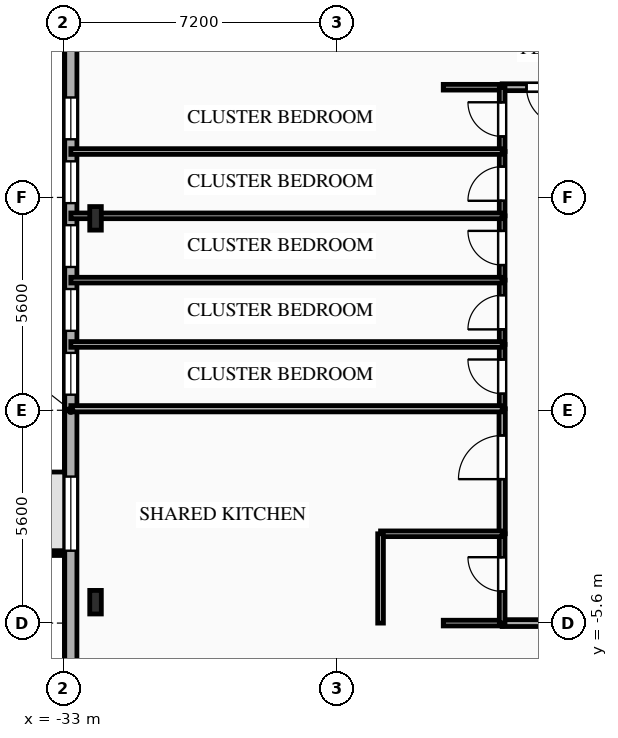
"""IFC4 building model, lengths in metres.
Left out: names, types, materials, properties, quantities, classifications, styles, units other than length and angle.
Written with IfcOpenShell. Run it as: python <this file> out.ifc"""

import sys

from ifc_helpers import new_model, si_unit, direction, frame, frame_2d, origin, origin_2d, place, context, subcontext, project, spatial, rectangle, i_section, extrude, element, fill, save


model = new_model("IFC4")
c1 = context("Model", 3, precision=1e-05, world=origin(), true_north=direction((0.0, 1.0)))
c2 = subcontext(c1, "Body", "Model", "MODEL_VIEW")
j1 = project(units=[si_unit("LENGTHUNIT", "METRE"), si_unit("PLANEANGLEUNIT", "RADIAN")], contexts=[c1])
p1 = place(None, origin())
s1 = spatial("IfcSite", under=j1, at=p1, CompositionType="ELEMENT")
p2 = place(p1, origin())
s2 = spatial("IfcBuilding", under=s1, at=p2, CompositionType="ELEMENT")
p3 = place(p2, frame((0.0, 0.0, 53.8)))
s3 = spatial("IfcBuildingStorey", under=s2, at=p3, CompositionType="ELEMENT", Elevation=53.8)
for number, where, z_axis, x_axis in (
    (1, (-32.15, 5.05, 0.0), (0.0, 0.0, 1.0), (1.0, 0.0, 0.0)),
    (2, (-32.15, -5.05, 0.0), (0.0, 0.0, 1.0), (1.0, 0.0, 0.0)),
):
    element("IfcColumn", number, at=place(p3, frame(where, z_axis=z_axis, x_axis=x_axis)), inside=s3, PredefinedType="COLUMN", context=c2, shape_type="SweptSolid", body=[
        extrude(i_section(OverallWidth=0.305, OverallDepth=0.62, WebThickness=0.021, FlangeThickness=0.04, FilletRadius=0.027, at=origin_2d()), origin(), (0.0, 0.0, 1.0), 3.35),
    ])
p4 = place(p3, frame((-32.8, -15.8, 0.0), z_axis=(0.0, 0.0, 1.0), x_axis=(0.0, 1.0, 0.0)))
e3 = element("IfcWall", 3, at=p4, inside=s3, PredefinedType="SOLIDWALL", context=c2, shape_type="SweptSolid", body=[
    extrude(rectangle(XDim=31.6, YDim=0.32, at=frame_2d((15.8, 0.0))), origin(), (0.0, 0.0, 1.0), 3.035),
])
p5 = place(p4, frame((12.105, 0.0, 0.85)))
e4 = element("IfcOpeningElement", 4, at=p5, cuts=e3, PredefinedType="OPENING", context=c2, shape_type="SweptSolid", body=[
    extrude(rectangle(XDim=1.95, YDim=1.85, at=frame_2d((0.975, 0.925))), frame((0.0, 0.17, 0.0), z_axis=(0.0, -1.0, 0.0), x_axis=(1.0, 0.0, 0.0)), (0.0, 0.0, 1.0), 0.34),
])
p6 = place(p4, frame((16.21, 0.0, 0.85)))
e5 = element("IfcOpeningElement", 5, at=p6, cuts=e3, PredefinedType="OPENING", context=c2, shape_type="SweptSolid", body=[
    extrude(rectangle(XDim=1.1, YDim=1.85, at=frame_2d((0.55, 0.925))), frame((0.0, 0.17, 0.0), z_axis=(0.0, -1.0, 0.0), x_axis=(1.0, 0.0, 0.0)), (0.0, 0.0, 1.0), 0.34),
])
p7 = place(p4, frame((17.89, 0.0, 0.85)))
e6 = element("IfcOpeningElement", 6, at=p7, cuts=e3, PredefinedType="OPENING", context=c2, shape_type="SweptSolid", body=[
    extrude(rectangle(XDim=1.1, YDim=1.85, at=frame_2d((0.55, 0.925))), frame((0.0, 0.17, 0.0), z_axis=(0.0, -1.0, 0.0), x_axis=(1.0, 0.0, 0.0)), (0.0, 0.0, 1.0), 0.34),
])
p8 = place(p4, frame((19.57, 0.0, 0.85)))
e7 = element("IfcOpeningElement", 7, at=p8, cuts=e3, PredefinedType="OPENING", context=c2, shape_type="SweptSolid", body=[
    extrude(rectangle(XDim=1.1, YDim=1.85, at=frame_2d((0.55, 0.925))), frame((0.0, 0.17, 0.0), z_axis=(0.0, -1.0, 0.0), x_axis=(1.0, 0.0, 0.0)), (0.0, 0.0, 1.0), 0.34),
])
p9 = place(p4, frame((21.25, 0.0, 0.85)))
e8 = element("IfcOpeningElement", 8, at=p9, cuts=e3, PredefinedType="OPENING", context=c2, shape_type="SweptSolid", body=[
    extrude(rectangle(XDim=1.1, YDim=1.85, at=frame_2d((0.55, 0.925))), frame((0.0, 0.17, 0.0), z_axis=(0.0, -1.0, 0.0), x_axis=(1.0, 0.0, 0.0)), (0.0, 0.0, 1.0), 0.34),
])
p10 = place(p4, frame((22.93, 0.0, 0.85)))
e9 = element("IfcOpeningElement", 9, at=p10, cuts=e3, PredefinedType="OPENING", context=c2, shape_type="SweptSolid", body=[
    extrude(rectangle(XDim=1.1, YDim=1.85, at=frame_2d((0.55, 0.925))), frame((0.0, 0.17, 0.0), z_axis=(0.0, -1.0, 0.0), x_axis=(1.0, 0.0, 0.0)), (0.0, 0.0, 1.0), 0.34),
])
p11 = place(p3, frame((-18.8, 8.5, 0.0), z_axis=(0.0, 0.0, 1.0), x_axis=(-1.0, 0.0, 0.0)))
e10 = element("IfcWall", 10, at=p11, inside=s3, PredefinedType="PARTITIONING", context=c2, shape_type="SweptSolid", body=[
    extrude(rectangle(XDim=2.65, YDim=0.18, at=frame_2d((1.325, 0.0))), origin(), (0.0, 0.0, 1.0), 3.035),
])
p12 = place(p11, frame((1.009, 0.0, 0.0)))
e11 = element("IfcOpeningElement", 11, at=p12, cuts=e10, PredefinedType="OPENING", context=c2, shape_type="SweptSolid", body=[
    extrude(rectangle(XDim=1.0, YDim=2.15, at=frame_2d((0.5, 1.075))), frame((0.0, 0.1, 0.0), z_axis=(0.0, -1.0, 0.0), x_axis=(1.0, 0.0, 0.0)), (0.0, 0.0, 1.0), 0.2),
])
p13 = place(p3, frame((-21.45, 8.5, 0.0), z_axis=(0.0, 0.0, 1.0), x_axis=(-1.0, 0.0, 0.0)))
e12 = element("IfcWall", 12, at=p13, inside=s3, PredefinedType="PARTITIONING", context=c2, shape_type="SweptSolid", body=[
    extrude(rectangle(XDim=1.55, YDim=0.15, at=frame_2d((0.775, 0.0))), origin(), (0.0, 0.0, 1.0), 3.035),
])
p14 = place(p3, frame((-21.45, -5.6, 0.0), z_axis=(0.0, 0.0, 1.0), x_axis=(1.0, 0.0, 0.0)))
e13 = element("IfcWall", 13, at=p14, inside=s3, PredefinedType="PARTITIONING", context=c2, shape_type="SweptSolid", body=[
    extrude(rectangle(XDim=2.65, YDim=0.18, at=frame_2d((1.325, 0.0))), origin(), (0.0, 0.0, 1.0), 3.035),
])
p15 = place(p3, frame((-23.0, -5.6, 0.0), z_axis=(0.0, 0.0, 1.0), x_axis=(1.0, 0.0, 0.0)))
e14 = element("IfcWall", 14, at=p15, inside=s3, PredefinedType="PLUMBINGWALL", context=c2, shape_type="SweptSolid", body=[
    extrude(rectangle(XDim=1.55, YDim=0.15, at=frame_2d((0.775, 0.0))), origin(), (0.0, 0.0, 1.0), 3.035),
])
p16 = place(p3, frame((-21.45, -5.6, 0.0), z_axis=(0.0, 0.0, 1.0), x_axis=(0.0, 1.0, 0.0)))
e15 = element("IfcWall", 15, at=p16, inside=s3, PredefinedType="PLUMBINGWALL", context=c2, shape_type="SweptSolid", body=[
    extrude(rectangle(XDim=2.35, YDim=0.15, at=frame_2d((1.175, 0.0))), origin(), (0.0, 0.0, 1.0), 3.035),
])
p17 = place(p16, frame((0.834, 0.0, 0.0)))
e16 = element("IfcOpeningElement", 16, at=p17, cuts=e15, PredefinedType="OPENING", context=c2, shape_type="SweptSolid", body=[
    extrude(rectangle(XDim=0.9, YDim=2.1, at=frame_2d((0.45, 1.05))), frame((0.0, 0.085, 0.0), z_axis=(0.0, -1.0, 0.0), x_axis=(1.0, 0.0, 0.0)), (0.0, 0.0, 1.0), 0.17),
])
p18 = place(p3, frame((-21.45, -3.25, 0.0), z_axis=(0.0, 0.0, 1.0), x_axis=(0.0, 1.0, 0.0)))
e17 = element("IfcWall", 17, at=p18, inside=s3, PredefinedType="PARTITIONING", context=c2, shape_type="SweptSolid", body=[
    extrude(rectangle(XDim=3.29, YDim=0.165, at=frame_2d((1.645, 0.0))), origin(), (0.0, 0.0, 1.0), 3.035),
])
p19 = place(p18, frame((1.438, 0.0, 0.0)))
e18 = element("IfcOpeningElement", 18, at=p19, cuts=e17, PredefinedType="OPENING", context=c2, shape_type="SweptSolid", body=[
    extrude(rectangle(XDim=1.15, YDim=2.15, at=frame_2d((0.575, 1.075))), frame((0.0, 0.093, 0.0), z_axis=(0.0, -1.0, 0.0), x_axis=(1.0, 0.0, 0.0)), (0.0, 0.0, 1.0), 0.185),
])
p20 = place(p3, frame((-21.45, 0.04, 0.0), z_axis=(0.0, 0.0, 1.0), x_axis=(0.0, 1.0, 0.0)))
e19 = element("IfcWall", 19, at=p20, inside=s3, PredefinedType="PARTITIONING", context=c2, shape_type="SweptSolid", body=[
    extrude(rectangle(XDim=1.692, YDim=0.15, at=frame_2d((0.846, 0.0))), origin(), (0.0, 0.0, 1.0), 3.035),
])
p21 = place(p20, frame((0.396, 0.0, 0.0)))
e20 = element("IfcOpeningElement", 20, at=p21, cuts=e19, PredefinedType="OPENING", context=c2, shape_type="SweptSolid", body=[
    extrude(rectangle(XDim=0.9, YDim=2.1, at=frame_2d((0.45, 1.05))), frame((0.0, 0.085, 0.0), z_axis=(0.0, -1.0, 0.0), x_axis=(1.0, 0.0, 0.0)), (0.0, 0.0, 1.0), 0.17),
])
p22 = place(p3, frame((-21.45, 1.732, 0.0), z_axis=(0.0, 0.0, 1.0), x_axis=(0.0, 1.0, 0.0)))
e21 = element("IfcWall", 21, at=p22, inside=s3, PredefinedType="PARTITIONING", context=c2, shape_type="SweptSolid", body=[
    extrude(rectangle(XDim=1.692, YDim=0.15, at=frame_2d((0.846, 0.0))), origin(), (0.0, 0.0, 1.0), 3.035),
])
p23 = place(p22, frame((0.396, 0.0, 0.0)))
e22 = element("IfcOpeningElement", 22, at=p23, cuts=e21, PredefinedType="OPENING", context=c2, shape_type="SweptSolid", body=[
    extrude(rectangle(XDim=0.9, YDim=2.1, at=frame_2d((0.45, 1.05))), frame((0.0, 0.085, 0.0), z_axis=(0.0, -1.0, 0.0), x_axis=(1.0, 0.0, 0.0)), (0.0, 0.0, 1.0), 0.17),
])
p24 = place(p3, frame((-21.45, 3.424, 0.0), z_axis=(0.0, 0.0, 1.0), x_axis=(0.0, 1.0, 0.0)))
e23 = element("IfcWall", 23, at=p24, inside=s3, PredefinedType="PARTITIONING", context=c2, shape_type="SweptSolid", body=[
    extrude(rectangle(XDim=1.692, YDim=0.15, at=frame_2d((0.846, 0.0))), origin(), (0.0, 0.0, 1.0), 3.035),
])
p25 = place(p24, frame((0.396, 0.0, 0.0)))
e24 = element("IfcOpeningElement", 24, at=p25, cuts=e23, PredefinedType="OPENING", context=c2, shape_type="SweptSolid", body=[
    extrude(rectangle(XDim=0.9, YDim=2.1, at=frame_2d((0.45, 1.05))), frame((0.0, 0.085, 0.0), z_axis=(0.0, -1.0, 0.0), x_axis=(1.0, 0.0, 0.0)), (0.0, 0.0, 1.0), 0.17),
])
p26 = place(p3, frame((-21.45, 5.116, 0.0), z_axis=(0.0, 0.0, 1.0), x_axis=(0.0, 1.0, 0.0)))
e25 = element("IfcWall", 25, at=p26, inside=s3, PredefinedType="PARTITIONING", context=c2, shape_type="SweptSolid", body=[
    extrude(rectangle(XDim=1.692, YDim=0.15, at=frame_2d((0.846, 0.0))), origin(), (0.0, 0.0, 1.0), 3.035),
])
p27 = place(p26, frame((0.396, 0.0, 0.0)))
e26 = element("IfcOpeningElement", 26, at=p27, cuts=e25, PredefinedType="OPENING", context=c2, shape_type="SweptSolid", body=[
    extrude(rectangle(XDim=0.9, YDim=2.1, at=frame_2d((0.45, 1.05))), frame((0.0, 0.085, 0.0), z_axis=(0.0, -1.0, 0.0), x_axis=(1.0, 0.0, 0.0)), (0.0, 0.0, 1.0), 0.17),
])
p28 = place(p3, frame((-21.45, 6.808, 0.0), z_axis=(0.0, 0.0, 1.0), x_axis=(0.0, 1.0, 0.0)))
e27 = element("IfcWall", 27, at=p28, inside=s3, PredefinedType="PARTITIONING", context=c2, shape_type="SweptSolid", body=[
    extrude(rectangle(XDim=1.692, YDim=0.15, at=frame_2d((0.846, 0.0))), origin(), (0.0, 0.0, 1.0), 3.035),
])
p29 = place(p28, frame((0.396, 0.0, 0.0)))
e28 = element("IfcOpeningElement", 28, at=p29, cuts=e27, PredefinedType="OPENING", context=c2, shape_type="SweptSolid", body=[
    extrude(rectangle(XDim=0.9, YDim=2.1, at=frame_2d((0.45, 1.05))), frame((0.0, 0.085, 0.0), z_axis=(0.0, -1.0, 0.0), x_axis=(1.0, 0.0, 0.0)), (0.0, 0.0, 1.0), 0.17),
])
p30 = place(p3, frame((-24.65, -3.25, 0.0), z_axis=(0.0, 0.0, 1.0), x_axis=(1.0, 0.0, 0.0)))
e29 = element("IfcWall", 29, at=p30, inside=s3, PredefinedType="PLUMBINGWALL", context=c2, shape_type="SweptSolid", body=[
    extrude(rectangle(XDim=3.2, YDim=0.15, at=frame_2d((1.6, 0.0))), origin(), (0.0, 0.0, 1.0), 2.52),
])
p31 = place(p3, frame((-24.65, -5.6, 0.0), z_axis=(0.0, 0.0, 1.0), x_axis=(0.0, 1.0, 0.0)))
e30 = element("IfcWall", 30, at=p31, inside=s3, PredefinedType="PLUMBINGWALL", context=c2, shape_type="SweptSolid", body=[
    extrude(rectangle(XDim=2.35, YDim=0.15, at=frame_2d((1.175, 0.0))), origin(), (0.0, 0.0, 1.0), 3.035),
])
p32 = place(p3, frame((-32.8, 0.04, 0.0), z_axis=(0.0, 0.0, 1.0), x_axis=(1.0, 0.0, 0.0)))
e31 = element("IfcWall", 31, at=p32, inside=s3, PredefinedType="PARTITIONING", context=c2, shape_type="SweptSolid", body=[
    extrude(rectangle(XDim=11.35, YDim=0.165, at=frame_2d((5.675, 0.0))), origin(), (0.0, 0.0, 1.0), 3.035),
])
p33 = place(p3, frame((-32.8, 1.732, 0.0), z_axis=(0.0, 0.0, 1.0), x_axis=(1.0, 0.0, 0.0)))
e32 = element("IfcWall", 32, at=p33, inside=s3, PredefinedType="PARTITIONING", context=c2, shape_type="SweptSolid", body=[
    extrude(rectangle(XDim=11.35, YDim=0.15, at=frame_2d((5.675, 0.0))), origin(), (0.0, 0.0, 1.0), 3.035),
])
for number, where, z_axis, x_axis in (
    (33, (-32.8, 3.424, 0.0), (0.0, 0.0, 1.0), (1.0, 0.0, 0.0)),
    (34, (-32.8, 5.116, 0.0), (0.0, 0.0, 1.0), (1.0, 0.0, 0.0)),
):
    element("IfcWall", number, at=place(p3, frame(where, z_axis=z_axis, x_axis=x_axis)), inside=s3, PredefinedType="PARTITIONING", context=c2, shape_type="SweptSolid", body=[
        extrude(rectangle(XDim=11.35, YDim=0.15, at=frame_2d((5.675, 0.0))), origin(), (0.0, 0.0, 1.0), 2.52),
    ])
p34 = place(p3, frame((-32.8, 6.808, 0.0), z_axis=(0.0, 0.0, 1.0), x_axis=(1.0, 0.0, 0.0)))
e35 = element("IfcWall", 35, at=p34, inside=s3, PredefinedType="PARTITIONING", context=c2, shape_type="SweptSolid", body=[
    extrude(rectangle(XDim=11.35, YDim=0.15, at=frame_2d((5.675, 0.0))), origin(), (0.0, 0.0, 1.0), 3.035),
])
p35 = place(p5, origin())
e36 = element("IfcWindow", 36, at=p35, inside=s3, PartitioningType="SINGLE_PANEL", PredefinedType="WINDOW", context=c2, shape_type="SweptSolid", body=[
    extrude(rectangle(XDim=1.95, YDim=1.85, at=frame_2d((0.975, 0.925))), frame((0.0, 0.03, 0.0), z_axis=(0.0, -1.0, 0.0), x_axis=(1.0, 0.0, 0.0)), (0.0, 0.0, 1.0), 0.06),
])
fill(e4, e36)
p36 = place(p6, origin())
e37 = element("IfcWindow", 37, at=p36, inside=s3, PartitioningType="SINGLE_PANEL", PredefinedType="WINDOW", context=c2, shape_type="SweptSolid", body=[
    extrude(rectangle(XDim=1.1, YDim=1.85, at=frame_2d((0.55, 0.925))), frame((0.0, 0.03, 0.0), z_axis=(0.0, -1.0, 0.0), x_axis=(1.0, 0.0, 0.0)), (0.0, 0.0, 1.0), 0.06),
])
fill(e5, e37)
p37 = place(p7, origin())
e38 = element("IfcWindow", 38, at=p37, inside=s3, PartitioningType="SINGLE_PANEL", PredefinedType="WINDOW", context=c2, shape_type="SweptSolid", body=[
    extrude(rectangle(XDim=1.1, YDim=1.85, at=frame_2d((0.55, 0.925))), frame((0.0, 0.03, 0.0), z_axis=(0.0, -1.0, 0.0), x_axis=(1.0, 0.0, 0.0)), (0.0, 0.0, 1.0), 0.06),
])
fill(e6, e38)
p38 = place(p8, origin())
e39 = element("IfcWindow", 39, at=p38, inside=s3, PartitioningType="SINGLE_PANEL", PredefinedType="WINDOW", context=c2, shape_type="SweptSolid", body=[
    extrude(rectangle(XDim=1.1, YDim=1.85, at=frame_2d((0.55, 0.925))), frame((0.0, 0.03, 0.0), z_axis=(0.0, -1.0, 0.0), x_axis=(1.0, 0.0, 0.0)), (0.0, 0.0, 1.0), 0.06),
])
fill(e7, e39)
p39 = place(p9, origin())
e40 = element("IfcWindow", 40, at=p39, inside=s3, PartitioningType="SINGLE_PANEL", PredefinedType="WINDOW", context=c2, shape_type="SweptSolid", body=[
    extrude(rectangle(XDim=1.1, YDim=1.85, at=frame_2d((0.55, 0.925))), frame((0.0, 0.03, 0.0), z_axis=(0.0, -1.0, 0.0), x_axis=(1.0, 0.0, 0.0)), (0.0, 0.0, 1.0), 0.06),
])
fill(e8, e40)
p40 = place(p10, origin())
e41 = element("IfcWindow", 41, at=p40, inside=s3, PartitioningType="SINGLE_PANEL", PredefinedType="WINDOW", context=c2, shape_type="SweptSolid", body=[
    extrude(rectangle(XDim=1.1, YDim=1.85, at=frame_2d((0.55, 0.925))), frame((0.0, 0.03, 0.0), z_axis=(0.0, -1.0, 0.0), x_axis=(1.0, 0.0, 0.0)), (0.0, 0.0, 1.0), 0.06),
])
fill(e9, e41)
p41 = place(p12, origin())
e42 = element("IfcDoor", 42, at=p41, inside=s3, OperationType="SINGLE_SWING_LEFT", PredefinedType="DOOR", context=c2, shape_type="SweptSolid", body=[
    extrude(rectangle(XDim=1.0, YDim=2.15, at=frame_2d((0.5, 1.075))), frame((0.0, 0.025, 0.0), z_axis=(0.0, -1.0, 0.0), x_axis=(1.0, 0.0, 0.0)), (0.0, 0.0, 1.0), 0.05),
])
fill(e11, e42)
p42 = place(p17, origin())
e43 = element("IfcDoor", 43, at=p42, inside=s3, OperationType="SINGLE_SWING_RIGHT", PredefinedType="DOOR", context=c2, shape_type="SweptSolid", body=[
    extrude(rectangle(XDim=0.9, YDim=2.1, at=frame_2d((0.45, 1.05))), frame((0.0, 0.025, 0.0), z_axis=(0.0, -1.0, 0.0), x_axis=(1.0, 0.0, 0.0)), (0.0, 0.0, 1.0), 0.05),
])
fill(e16, e43)
p43 = place(p19, origin())
e44 = element("IfcDoor", 44, at=p43, inside=s3, OperationType="SINGLE_SWING_LEFT", PredefinedType="DOOR", context=c2, shape_type="SweptSolid", body=[
    extrude(rectangle(XDim=1.15, YDim=2.15, at=frame_2d((0.575, 1.075))), frame((0.0, 0.025, 0.0), z_axis=(0.0, -1.0, 0.0), x_axis=(1.0, 0.0, 0.0)), (0.0, 0.0, 1.0), 0.05),
])
fill(e18, e44)
p44 = place(p21, origin())
e45 = element("IfcDoor", 45, at=p44, inside=s3, OperationType="SINGLE_SWING_RIGHT", PredefinedType="DOOR", context=c2, shape_type="SweptSolid", body=[
    extrude(rectangle(XDim=0.9, YDim=2.1, at=frame_2d((0.45, 1.05))), frame((0.0, 0.025, 0.0), z_axis=(0.0, -1.0, 0.0), x_axis=(1.0, 0.0, 0.0)), (0.0, 0.0, 1.0), 0.05),
])
fill(e20, e45)
p45 = place(p23, origin())
e46 = element("IfcDoor", 46, at=p45, inside=s3, OperationType="SINGLE_SWING_LEFT", PredefinedType="DOOR", context=c2, shape_type="SweptSolid", body=[
    extrude(rectangle(XDim=0.9, YDim=2.1, at=frame_2d((0.45, 1.05))), frame((0.0, 0.025, 0.0), z_axis=(0.0, -1.0, 0.0), x_axis=(1.0, 0.0, 0.0)), (0.0, 0.0, 1.0), 0.05),
])
fill(e22, e46)
p46 = place(p25, origin())
e47 = element("IfcDoor", 47, at=p46, inside=s3, OperationType="SINGLE_SWING_RIGHT", PredefinedType="DOOR", context=c2, shape_type="SweptSolid", body=[
    extrude(rectangle(XDim=0.9, YDim=2.1, at=frame_2d((0.45, 1.05))), frame((0.0, 0.025, 0.0), z_axis=(0.0, -1.0, 0.0), x_axis=(1.0, 0.0, 0.0)), (0.0, 0.0, 1.0), 0.05),
])
fill(e24, e47)
p47 = place(p27, origin())
e48 = element("IfcDoor", 48, at=p47, inside=s3, OperationType="SINGLE_SWING_LEFT", PredefinedType="DOOR", context=c2, shape_type="SweptSolid", body=[
    extrude(rectangle(XDim=0.9, YDim=2.1, at=frame_2d((0.45, 1.05))), frame((0.0, 0.025, 0.0), z_axis=(0.0, -1.0, 0.0), x_axis=(1.0, 0.0, 0.0)), (0.0, 0.0, 1.0), 0.05),
])
fill(e26, e48)
p48 = place(p29, origin())
e49 = element("IfcDoor", 49, at=p48, inside=s3, OperationType="SINGLE_SWING_RIGHT", PredefinedType="DOOR", context=c2, shape_type="SweptSolid", body=[
    extrude(rectangle(XDim=0.9, YDim=2.1, at=frame_2d((0.45, 1.05))), frame((0.0, 0.025, 0.0), z_axis=(0.0, -1.0, 0.0), x_axis=(1.0, 0.0, 0.0)), (0.0, 0.0, 1.0), 0.05),
])
fill(e28, e49)
save(model, sys.argv[1])
